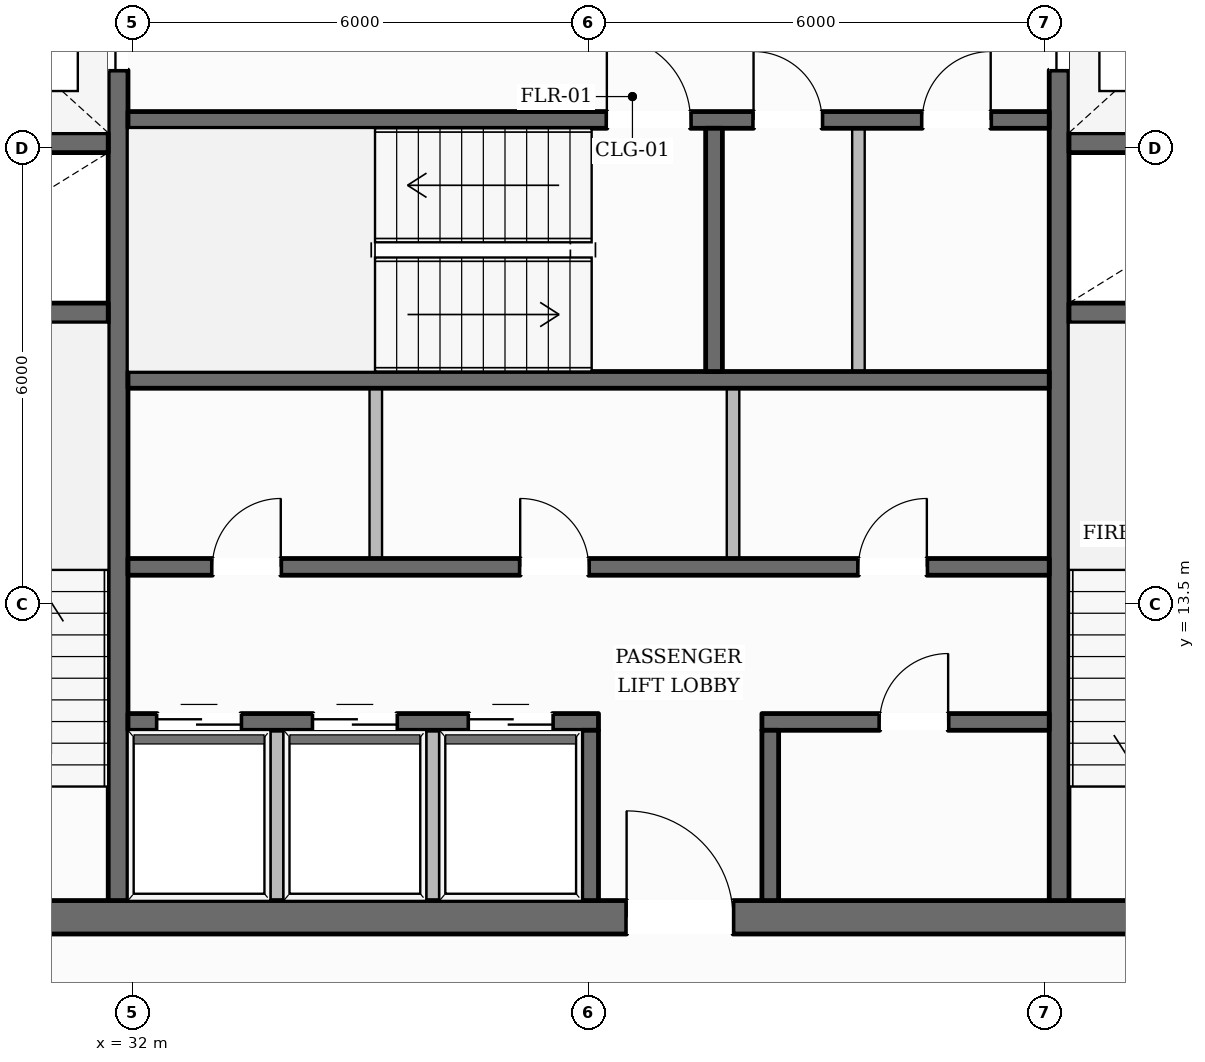
"""IFC4 building model, lengths in metres.
Left out: names, types, materials, properties, quantities, classifications, styles, units other than length and angle.
Written with IfcOpenShell. Run it as: python <this file> out.ifc"""

import sys

from ifc_helpers import new_model, si_unit, direction, frame, frame_2d, origin, place, context, subcontext, project, spatial, rectangle, extrude, element, fill, save


model = new_model("IFC4")
c1 = context("Model", 3, precision=1e-05, world=origin(), true_north=direction((0.0, 1.0)))
c2 = subcontext(c1, "Body", "Model", "MODEL_VIEW")
j1 = project(units=[si_unit("LENGTHUNIT", "METRE"), si_unit("PLANEANGLEUNIT", "RADIAN")], contexts=[c1])
p1 = place(None, origin())
s1 = spatial("IfcSite", under=j1, at=p1, CompositionType="ELEMENT")
p2 = place(p1, origin())
s2 = spatial("IfcBuilding", under=s1, at=p2, CompositionType="ELEMENT")
p3 = place(p2, frame((0.0, 0.0, 207.35)))
s3 = spatial("IfcBuildingStorey", under=s2, at=p3, CompositionType="ELEMENT", Elevation=207.35)
p4 = place(p3, frame((28.04, 9.38, 0.0), z_axis=(0.0, 0.0, 1.0), x_axis=(1.0, 0.0, 0.0)))
e1 = element("IfcWall", 1, at=p4, inside=s3, PredefinedType="SOLIDWALL", context=c2, shape_type="SweptSolid", body=[
    extrude(rectangle(XDim=19.92, YDim=0.44, at=frame_2d((9.96, 0.0))), origin(), (0.0, 0.0, 1.0), 3.6),
])
p5 = place(p4, frame((10.46, 0.0, 0.0)))
e2 = element("IfcOpeningElement", 2, at=p5, cuts=e1, PredefinedType="OPENING", context=c2, shape_type="SweptSolid", body=[
    extrude(rectangle(XDim=1.4, YDim=2.2, at=frame_2d((0.7, 1.1))), frame((0.0, 0.23, 0.0), z_axis=(0.0, -1.0, 0.0), x_axis=(1.0, 0.0, 0.0)), (0.0, 0.0, 1.0), 0.46),
])
p6 = place(p3, frame((31.81, 9.6, 0.0), z_axis=(0.0, 0.0, 1.0), x_axis=(0.0, 1.0, 0.0)))
e3 = element("IfcWall", 3, at=p6, inside=s3, PredefinedType="SHEAR", context=c2, shape_type="SweptSolid", body=[
    extrude(rectangle(XDim=13.0, YDim=0.26, at=frame_2d((6.5, 0.0))), origin(), (0.0, 0.0, 1.0), 3.6),
])
p7 = place(p6, frame((10.925, 0.0, 0.0)))
e4 = element("IfcOpeningElement", 4, at=p7, cuts=e3, PredefinedType="OPENING", context=c2, shape_type="SweptSolid", body=[
    extrude(rectangle(XDim=1.25, YDim=2.25, at=frame_2d((0.625, 1.125))), frame((0.0, 0.14, 0.0), z_axis=(0.0, -1.0, 0.0), x_axis=(1.0, 0.0, 0.0)), (0.0, 0.0, 1.0), 0.28),
])
p8 = place(p3, frame((44.19, 9.6, 0.0), z_axis=(0.0, 0.0, 1.0), x_axis=(0.0, 1.0, 0.0)))
e5 = element("IfcWall", 5, at=p8, inside=s3, PredefinedType="SHEAR", context=c2, shape_type="SweptSolid", body=[
    extrude(rectangle(XDim=13.0, YDim=0.26, at=frame_2d((6.5, 0.0))), origin(), (0.0, 0.0, 1.0), 3.6),
])
p9 = place(p8, frame((10.925, 0.0, 0.0)))
e6 = element("IfcOpeningElement", 6, at=p9, cuts=e5, PredefinedType="OPENING", context=c2, shape_type="SweptSolid", body=[
    extrude(rectangle(XDim=1.25, YDim=2.25, at=frame_2d((0.625, 1.125))), frame((0.0, 0.14, 0.0), z_axis=(0.0, -1.0, 0.0), x_axis=(1.0, 0.0, 0.0)), (0.0, 0.0, 1.0), 0.28),
])
for number, where, z_axis, x_axis in (
    (7, (28.48, 17.33, 0.0), (0.0, 0.0, 1.0), (1.0, 0.0, 0.0)),
    (8, (28.48, 19.57, 0.0), (0.0, 0.0, 1.0), (1.0, 0.0, 0.0)),
    (9, (44.32, 17.33, 0.0), (0.0, 0.0, 1.0), (1.0, 0.0, 0.0)),
    (10, (44.32, 19.57, 0.0), (0.0, 0.0, 1.0), (1.0, 0.0, 0.0)),
):
    element("IfcWall", number, at=place(p3, frame(where, z_axis=z_axis, x_axis=x_axis)), inside=s3, PredefinedType="SHEAR", context=c2, shape_type="SweptSolid", body=[
        extrude(rectangle(XDim=3.2, YDim=0.26, at=frame_2d((1.6, 0.0))), origin(), (0.0, 0.0, 1.0), 3.6),
    ])
p10 = place(p3, frame((31.94, 19.87, 0.0), z_axis=(0.0, 0.0, 1.0), x_axis=(1.0, 0.0, 0.0)))
e11 = element("IfcWall", 11, at=p10, inside=s3, PredefinedType="SOLIDWALL", context=c2, shape_type="SweptSolid", body=[
    extrude(rectangle(XDim=12.12, YDim=0.22, at=frame_2d((6.06, 0.0))), origin(), (0.0, 0.0, 1.0), 3.6),
])
p11 = place(p10, frame((6.3, 0.0, 0.0)))
e12 = element("IfcOpeningElement", 12, at=p11, cuts=e11, PredefinedType="OPENING", context=c2, shape_type="SweptSolid", body=[
    extrude(rectangle(XDim=1.1, YDim=2.15, at=frame_2d((0.55, 1.075))), frame((0.0, 0.12, 0.0), z_axis=(0.0, -1.0, 0.0), x_axis=(1.0, 0.0, 0.0)), (0.0, 0.0, 1.0), 0.24),
])
p12 = place(p10, frame((8.23, 0.0, 0.0)))
e13 = element("IfcOpeningElement", 13, at=p12, cuts=e11, PredefinedType="OPENING", context=c2, shape_type="SweptSolid", body=[
    extrude(rectangle(XDim=0.9, YDim=2.1, at=frame_2d((0.45, 1.05))), frame((0.0, 0.12, 0.0), z_axis=(0.0, -1.0, 0.0), x_axis=(1.0, 0.0, 0.0)), (0.0, 0.0, 1.0), 0.24),
])
p13 = place(p10, frame((10.45, 0.0, 0.0)))
e14 = element("IfcOpeningElement", 14, at=p13, cuts=e11, PredefinedType="OPENING", context=c2, shape_type="SweptSolid", body=[
    extrude(rectangle(XDim=0.9, YDim=2.1, at=frame_2d((0.45, 1.05))), frame((0.0, 0.12, 0.0), z_axis=(0.0, -1.0, 0.0), x_axis=(1.0, 0.0, 0.0)), (0.0, 0.0, 1.0), 0.24),
])
p14 = place(p3, frame((31.94, 16.45, 0.0), z_axis=(0.0, 0.0, 1.0), x_axis=(1.0, 0.0, 0.0)))
e15 = element("IfcWall", 15, at=p14, inside=s3, PredefinedType="SOLIDWALL", context=c2, shape_type="SweptSolid", body=[
    extrude(rectangle(XDim=12.12, YDim=0.22, at=frame_2d((6.06, 0.0))), origin(), (0.0, 0.0, 1.0), 3.6),
])
p15 = place(p3, frame((39.65, 16.56, 0.0), z_axis=(0.0, 0.0, 1.0), x_axis=(0.0, 1.0, 0.0)))
e16 = element("IfcWall", 16, at=p15, inside=s3, PredefinedType="SOLIDWALL", context=c2, shape_type="SweptSolid", body=[
    extrude(rectangle(XDim=3.2, YDim=0.22, at=frame_2d((1.6, 0.0))), origin(), (0.0, 0.0, 1.0), 3.6),
])
p16 = place(p3, frame((31.94, 13.99, 0.0), z_axis=(0.0, 0.0, 1.0), x_axis=(1.0, 0.0, 0.0)))
e17 = element("IfcWall", 17, at=p16, inside=s3, PredefinedType="SOLIDWALL", context=c2, shape_type="SweptSolid", body=[
    extrude(rectangle(XDim=12.12, YDim=0.22, at=frame_2d((6.06, 0.0))), origin(), (0.0, 0.0, 1.0), 3.6),
])
p17 = place(p16, frame((1.11, 0.0, 0.0)))
e18 = element("IfcOpeningElement", 18, at=p17, cuts=e17, PredefinedType="OPENING", context=c2, shape_type="SweptSolid", body=[
    extrude(rectangle(XDim=0.9, YDim=2.1, at=frame_2d((0.45, 1.05))), frame((0.0, 0.12, 0.0), z_axis=(0.0, -1.0, 0.0), x_axis=(1.0, 0.0, 0.0)), (0.0, 0.0, 1.0), 0.24),
])
p18 = place(p16, frame((5.16, 0.0, 0.0)))
e19 = element("IfcOpeningElement", 19, at=p18, cuts=e17, PredefinedType="OPENING", context=c2, shape_type="SweptSolid", body=[
    extrude(rectangle(XDim=0.9, YDim=2.1, at=frame_2d((0.45, 1.05))), frame((0.0, 0.12, 0.0), z_axis=(0.0, -1.0, 0.0), x_axis=(1.0, 0.0, 0.0)), (0.0, 0.0, 1.0), 0.24),
])
p19 = place(p16, frame((9.61, 0.0, 0.0)))
e20 = element("IfcOpeningElement", 20, at=p19, cuts=e17, PredefinedType="OPENING", context=c2, shape_type="SweptSolid", body=[
    extrude(rectangle(XDim=0.9, YDim=2.1, at=frame_2d((0.45, 1.05))), frame((0.0, 0.12, 0.0), z_axis=(0.0, -1.0, 0.0), x_axis=(1.0, 0.0, 0.0)), (0.0, 0.0, 1.0), 0.24),
])
p20 = place(p3, frame((31.94, 11.95, 0.0), z_axis=(0.0, 0.0, 1.0), x_axis=(1.0, 0.0, 0.0)))
e21 = element("IfcWall", 21, at=p20, inside=s3, PredefinedType="SOLIDWALL", context=c2, shape_type="SweptSolid", body=[
    extrude(rectangle(XDim=6.19, YDim=0.22, at=frame_2d((3.095, 0.0))), origin(), (0.0, 0.0, 1.0), 3.6),
])
p21 = place(p20, frame((0.385, 0.0, 0.0)))
e22 = element("IfcOpeningElement", 22, at=p21, cuts=e21, PredefinedType="OPENING", context=c2, shape_type="SweptSolid", body=[
    extrude(rectangle(XDim=1.1, YDim=2.2, at=frame_2d((0.55, 1.1))), frame((0.0, 0.12, 0.0), z_axis=(0.0, -1.0, 0.0), x_axis=(1.0, 0.0, 0.0)), (0.0, 0.0, 1.0), 0.24),
])
p22 = place(p20, frame((2.435, 0.0, 0.0)))
e23 = element("IfcOpeningElement", 23, at=p22, cuts=e21, PredefinedType="OPENING", context=c2, shape_type="SweptSolid", body=[
    extrude(rectangle(XDim=1.1, YDim=2.2, at=frame_2d((0.55, 1.1))), frame((0.0, 0.12, 0.0), z_axis=(0.0, -1.0, 0.0), x_axis=(1.0, 0.0, 0.0)), (0.0, 0.0, 1.0), 0.24),
])
p23 = place(p20, frame((4.485, 0.0, 0.0)))
e24 = element("IfcOpeningElement", 24, at=p23, cuts=e21, PredefinedType="OPENING", context=c2, shape_type="SweptSolid", body=[
    extrude(rectangle(XDim=1.1, YDim=2.2, at=frame_2d((0.55, 1.1))), frame((0.0, 0.12, 0.0), z_axis=(0.0, -1.0, 0.0), x_axis=(1.0, 0.0, 0.0)), (0.0, 0.0, 1.0), 0.24),
])
p24 = place(p3, frame((40.28, 11.95, 0.0), z_axis=(0.0, 0.0, 1.0), x_axis=(1.0, 0.0, 0.0)))
e25 = element("IfcWall", 25, at=p24, inside=s3, PredefinedType="SOLIDWALL", context=c2, shape_type="SweptSolid", body=[
    extrude(rectangle(XDim=3.78, YDim=0.22, at=frame_2d((1.89, 0.0))), origin(), (0.0, 0.0, 1.0), 3.6),
])
p25 = place(p24, frame((1.55, 0.0, 0.0)))
e26 = element("IfcOpeningElement", 26, at=p25, cuts=e25, PredefinedType="OPENING", context=c2, shape_type="SweptSolid", body=[
    extrude(rectangle(XDim=0.9, YDim=2.1, at=frame_2d((0.45, 1.05))), frame((0.0, 0.12, 0.0), z_axis=(0.0, -1.0, 0.0), x_axis=(1.0, 0.0, 0.0)), (0.0, 0.0, 1.0), 0.24),
])
for number, where, z_axis, x_axis in (
    (27, (38.02, 9.6, 0.0), (0.0, 0.0, 1.0), (0.0, 1.0, 0.0)),
    (28, (40.39, 9.6, 0.0), (0.0, 0.0, 1.0), (0.0, 1.0, 0.0)),
):
    element("IfcWall", number, at=place(p3, frame(where, z_axis=z_axis, x_axis=x_axis)), inside=s3, PredefinedType="SOLIDWALL", context=c2, shape_type="SweptSolid", body=[
        extrude(rectangle(XDim=2.24, YDim=0.22, at=frame_2d((1.12, 0.0))), origin(), (0.0, 0.0, 1.0), 3.6),
    ])
p26 = place(p3, frame((14.256, 11.0, 0.0), z_axis=(0.0, 0.0, 1.0), x_axis=(0.508231558921, 0.861220461042, 0.0)))
e29 = element("IfcWall", 29, at=p26, inside=s3, PredefinedType="STANDARD", context=c2, shape_type="SweptSolid", body=[
    extrude(rectangle(XDim=38.41, YDim=0.35, at=frame_2d((19.205, 0.0))), origin(), (0.0, 0.0, 1.0), 3.132),
])
p27 = place(p26, frame((34.091, 0.0, 0.65)))
e30 = element("IfcOpeningElement", 30, at=p27, cuts=e29, PredefinedType="OPENING", context=c2, shape_type="SweptSolid", body=[
    extrude(rectangle(XDim=1.45, YDim=1.75, at=frame_2d((0.725, 0.875))), frame((0.0, 0.185, 0.0), z_axis=(0.0, -1.0, 0.0), x_axis=(1.0, 0.0, 0.0)), (0.0, 0.0, 1.0), 0.37),
])
p28 = place(p26, frame((27.848, 0.0, 0.65)))
e31 = element("IfcOpeningElement", 31, at=p28, cuts=e29, PredefinedType="OPENING", context=c2, shape_type="SweptSolid", body=[
    extrude(rectangle(XDim=1.45, YDim=1.75, at=frame_2d((0.725, 0.875))), frame((0.0, 0.185, 0.0), z_axis=(0.0, -1.0, 0.0), x_axis=(1.0, 0.0, 0.0)), (0.0, 0.0, 1.0), 0.37),
])
p29 = place(p26, frame((21.606, 0.0, 0.65)))
e32 = element("IfcOpeningElement", 32, at=p29, cuts=e29, PredefinedType="OPENING", context=c2, shape_type="SweptSolid", body=[
    extrude(rectangle(XDim=1.45, YDim=1.75, at=frame_2d((0.725, 0.875))), frame((0.0, 0.185, 0.0), z_axis=(0.0, -1.0, 0.0), x_axis=(1.0, 0.0, 0.0)), (0.0, 0.0, 1.0), 0.37),
])
p30 = place(p26, frame((9.121, 0.0, 0.65)))
e33 = element("IfcOpeningElement", 33, at=p30, cuts=e29, PredefinedType="OPENING", context=c2, shape_type="SweptSolid", body=[
    extrude(rectangle(XDim=1.45, YDim=1.75, at=frame_2d((0.725, 0.875))), frame((0.0, 0.185, 0.0), z_axis=(0.0, -1.0, 0.0), x_axis=(1.0, 0.0, 0.0)), (0.0, 0.0, 1.0), 0.37),
])
p31 = place(p26, frame((2.878, 0.0, 0.65)))
e34 = element("IfcOpeningElement", 34, at=p31, cuts=e29, PredefinedType="OPENING", context=c2, shape_type="SweptSolid", body=[
    extrude(rectangle(XDim=1.45, YDim=1.75, at=frame_2d((0.725, 0.875))), frame((0.0, 0.185, 0.0), z_axis=(0.0, -1.0, 0.0), x_axis=(1.0, 0.0, 0.0)), (0.0, 0.0, 1.0), 0.37),
])
p32 = place(p3, frame((42.167, 44.113, 0.0), z_axis=(0.0, 0.0, 1.0), x_axis=(0.50509390827, -0.863064391473, 0.0)))
e35 = element("IfcWall", 35, at=p32, inside=s3, PredefinedType="STANDARD", context=c2, shape_type="SweptSolid", body=[
    extrude(rectangle(XDim=38.167, YDim=0.35, at=frame_2d((19.083, 0.0))), origin(), (0.0, 0.0, 1.0), 3.132),
])
p33 = place(p32, frame((28.025, 0.0, 0.0)))
e36 = element("IfcOpeningElement", 36, at=p33, cuts=e35, PredefinedType="OPENING", context=c2, shape_type="SweptSolid", body=[
    extrude(rectangle(XDim=1.0, YDim=2.2, at=frame_2d((0.5, 1.1))), frame((0.0, 0.185, 0.0), z_axis=(0.0, -1.0, 0.0), x_axis=(1.0, 0.0, 0.0)), (0.0, 0.0, 1.0), 0.37),
])
p34 = place(p32, frame((33.859, 0.0, 0.65)))
e37 = element("IfcOpeningElement", 37, at=p34, cuts=e35, PredefinedType="OPENING", context=c2, shape_type="SweptSolid", body=[
    extrude(rectangle(XDim=1.45, YDim=1.75, at=frame_2d((0.725, 0.875))), frame((0.0, 0.185, 0.0), z_axis=(0.0, -1.0, 0.0), x_axis=(1.0, 0.0, 0.0)), (0.0, 0.0, 1.0), 0.37),
])
p35 = place(p32, frame((21.456, 0.0, 0.65)))
e38 = element("IfcOpeningElement", 38, at=p35, cuts=e35, PredefinedType="OPENING", context=c2, shape_type="SweptSolid", body=[
    extrude(rectangle(XDim=1.45, YDim=1.75, at=frame_2d((0.725, 0.875))), frame((0.0, 0.185, 0.0), z_axis=(0.0, -1.0, 0.0), x_axis=(1.0, 0.0, 0.0)), (0.0, 0.0, 1.0), 0.37),
])
p36 = place(p32, frame((9.053, 0.0, 0.65)))
e39 = element("IfcOpeningElement", 39, at=p36, cuts=e35, PredefinedType="OPENING", context=c2, shape_type="SweptSolid", body=[
    extrude(rectangle(XDim=1.45, YDim=1.75, at=frame_2d((0.725, 0.875))), frame((0.0, 0.185, 0.0), z_axis=(0.0, -1.0, 0.0), x_axis=(1.0, 0.0, 0.0)), (0.0, 0.0, 1.0), 0.37),
])
p37 = place(p32, frame((2.852, 0.0, 0.65)))
e40 = element("IfcOpeningElement", 40, at=p37, cuts=e35, PredefinedType="OPENING", context=c2, shape_type="SweptSolid", body=[
    extrude(rectangle(XDim=1.45, YDim=1.75, at=frame_2d((0.725, 0.875))), frame((0.0, 0.185, 0.0), z_axis=(0.0, -1.0, 0.0), x_axis=(1.0, 0.0, 0.0)), (0.0, 0.0, 1.0), 0.37),
])
for number, where, z_axis, x_axis in (
    (41, (33.9, 9.52, 0.0), (0.0, 0.0, 1.0), (0.0, 1.0, 0.0)),
    (42, (35.95, 9.52, 0.0), (0.0, 0.0, 1.0), (0.0, 1.0, 0.0)),
):
    element("IfcWall", number, at=place(p3, frame(where, z_axis=z_axis, x_axis=x_axis)), inside=s3, PredefinedType="PARTITIONING", context=c2, shape_type="SweptSolid", body=[
        extrude(rectangle(XDim=2.32, YDim=0.165, at=frame_2d((1.16, 0.0))), origin(), (0.0, 0.0, 1.0), 3.6),
    ])
for number, where, z_axis, x_axis in (
    (43, (35.2, 14.1, 0.0), (0.0, 0.0, 1.0), (0.0, 1.0, 0.0)),
    (44, (39.9, 14.1, 0.0), (0.0, 0.0, 1.0), (0.0, 1.0, 0.0)),
):
    element("IfcWall", number, at=place(p3, frame(where, z_axis=z_axis, x_axis=x_axis)), inside=s3, PredefinedType="PARTITIONING", context=c2, shape_type="SweptSolid", body=[
        extrude(rectangle(XDim=2.24, YDim=0.165, at=frame_2d((1.12, 0.0))), origin(), (0.0, 0.0, 1.0), 3.6),
    ])
p38 = place(p3, frame((41.55, 16.56, 0.0), z_axis=(0.0, 0.0, 1.0), x_axis=(0.0, 1.0, 0.0)))
e45 = element("IfcWall", 45, at=p38, inside=s3, PredefinedType="PARTITIONING", context=c2, shape_type="SweptSolid", body=[
    extrude(rectangle(XDim=3.2, YDim=0.165, at=frame_2d((1.6, 0.0))), origin(), (0.0, 0.0, 1.0), 3.6),
])
p39 = place(p11, origin())
e46 = element("IfcDoor", 46, at=p39, inside=s3, OperationType="SINGLE_SWING_LEFT", PredefinedType="DOOR", context=c2, shape_type="SweptSolid", body=[
    extrude(rectangle(XDim=1.1, YDim=2.15, at=frame_2d((0.55, 1.075))), frame((0.0, 0.025, 0.0), z_axis=(0.0, -1.0, 0.0), x_axis=(1.0, 0.0, 0.0)), (0.0, 0.0, 1.0), 0.05),
])
fill(e12, e46)
p40 = place(p7, origin())
e47 = element("IfcDoor", 47, at=p40, inside=s3, OperationType="DOUBLE_DOOR_SLIDING", PredefinedType="DOOR", context=c2, shape_type="SweptSolid", body=[
    extrude(rectangle(XDim=1.25, YDim=2.25, at=frame_2d((0.625, 1.125))), frame((0.0, 0.025, 0.0), z_axis=(0.0, -1.0, 0.0), x_axis=(1.0, 0.0, 0.0)), (0.0, 0.0, 1.0), 0.05),
])
fill(e4, e47)
p41 = place(p9, origin())
e48 = element("IfcDoor", 48, at=p41, inside=s3, OperationType="DOUBLE_DOOR_SLIDING", PredefinedType="DOOR", context=c2, shape_type="SweptSolid", body=[
    extrude(rectangle(XDim=1.25, YDim=2.25, at=frame_2d((0.625, 1.125))), frame((0.0, 0.025, 0.0), z_axis=(0.0, -1.0, 0.0), x_axis=(1.0, 0.0, 0.0)), (0.0, 0.0, 1.0), 0.05),
])
fill(e6, e48)
p42 = place(p5, origin())
e49 = element("IfcDoor", 49, at=p42, inside=s3, OperationType="SINGLE_SWING_LEFT", PredefinedType="DOOR", context=c2, shape_type="SweptSolid", body=[
    extrude(rectangle(XDim=1.4, YDim=2.2, at=frame_2d((0.7, 1.1))), frame((0.0, 0.025, 0.0), z_axis=(0.0, -1.0, 0.0), x_axis=(1.0, 0.0, 0.0)), (0.0, 0.0, 1.0), 0.05),
])
fill(e2, e49)
p43 = place(p21, origin())
e50 = element("IfcDoor", 50, at=p43, inside=s3, OperationType="DOUBLE_DOOR_SLIDING", PredefinedType="DOOR", context=c2, shape_type="SweptSolid", body=[
    extrude(rectangle(XDim=1.1, YDim=2.2, at=frame_2d((0.55, 1.1))), frame((0.0, 0.025, 0.0), z_axis=(0.0, -1.0, 0.0), x_axis=(1.0, 0.0, 0.0)), (0.0, 0.0, 1.0), 0.05),
])
fill(e22, e50)
p44 = place(p22, origin())
e51 = element("IfcDoor", 51, at=p44, inside=s3, OperationType="DOUBLE_DOOR_SLIDING", PredefinedType="DOOR", context=c2, shape_type="SweptSolid", body=[
    extrude(rectangle(XDim=1.1, YDim=2.2, at=frame_2d((0.55, 1.1))), frame((0.0, 0.025, 0.0), z_axis=(0.0, -1.0, 0.0), x_axis=(1.0, 0.0, 0.0)), (0.0, 0.0, 1.0), 0.05),
])
fill(e23, e51)
p45 = place(p23, origin())
e52 = element("IfcDoor", 52, at=p45, inside=s3, OperationType="DOUBLE_DOOR_SLIDING", PredefinedType="DOOR", context=c2, shape_type="SweptSolid", body=[
    extrude(rectangle(XDim=1.1, YDim=2.2, at=frame_2d((0.55, 1.1))), frame((0.0, 0.025, 0.0), z_axis=(0.0, -1.0, 0.0), x_axis=(1.0, 0.0, 0.0)), (0.0, 0.0, 1.0), 0.05),
])
fill(e24, e52)
p46 = place(p17, origin())
e53 = element("IfcDoor", 53, at=p46, inside=s3, OperationType="SINGLE_SWING_RIGHT", PredefinedType="DOOR", context=c2, shape_type="SweptSolid", body=[
    extrude(rectangle(XDim=0.9, YDim=2.1, at=frame_2d((0.45, 1.05))), frame((0.0, 0.025, 0.0), z_axis=(0.0, -1.0, 0.0), x_axis=(1.0, 0.0, 0.0)), (0.0, 0.0, 1.0), 0.05),
])
fill(e18, e53)
p47 = place(p18, origin())
e54 = element("IfcDoor", 54, at=p47, inside=s3, OperationType="SINGLE_SWING_LEFT", PredefinedType="DOOR", context=c2, shape_type="SweptSolid", body=[
    extrude(rectangle(XDim=0.9, YDim=2.1, at=frame_2d((0.45, 1.05))), frame((0.0, 0.025, 0.0), z_axis=(0.0, -1.0, 0.0), x_axis=(1.0, 0.0, 0.0)), (0.0, 0.0, 1.0), 0.05),
])
fill(e19, e54)
p48 = place(p19, origin())
e55 = element("IfcDoor", 55, at=p48, inside=s3, OperationType="SINGLE_SWING_RIGHT", PredefinedType="DOOR", context=c2, shape_type="SweptSolid", body=[
    extrude(rectangle(XDim=0.9, YDim=2.1, at=frame_2d((0.45, 1.05))), frame((0.0, 0.025, 0.0), z_axis=(0.0, -1.0, 0.0), x_axis=(1.0, 0.0, 0.0)), (0.0, 0.0, 1.0), 0.05),
])
fill(e20, e55)
p49 = place(p12, origin())
e56 = element("IfcDoor", 56, at=p49, inside=s3, OperationType="SINGLE_SWING_LEFT", PredefinedType="DOOR", context=c2, shape_type="SweptSolid", body=[
    extrude(rectangle(XDim=0.9, YDim=2.1, at=frame_2d((0.45, 1.05))), frame((0.0, 0.025, 0.0), z_axis=(0.0, -1.0, 0.0), x_axis=(1.0, 0.0, 0.0)), (0.0, 0.0, 1.0), 0.05),
])
fill(e13, e56)
p50 = place(p13, origin())
e57 = element("IfcDoor", 57, at=p50, inside=s3, OperationType="SINGLE_SWING_RIGHT", PredefinedType="DOOR", context=c2, shape_type="SweptSolid", body=[
    extrude(rectangle(XDim=0.9, YDim=2.1, at=frame_2d((0.45, 1.05))), frame((0.0, 0.025, 0.0), z_axis=(0.0, -1.0, 0.0), x_axis=(1.0, 0.0, 0.0)), (0.0, 0.0, 1.0), 0.05),
])
fill(e14, e57)
p51 = place(p25, origin())
e58 = element("IfcDoor", 58, at=p51, inside=s3, OperationType="SINGLE_SWING_RIGHT", PredefinedType="DOOR", context=c2, shape_type="SweptSolid", body=[
    extrude(rectangle(XDim=0.9, YDim=2.1, at=frame_2d((0.45, 1.05))), frame((0.0, 0.025, 0.0), z_axis=(0.0, -1.0, 0.0), x_axis=(1.0, 0.0, 0.0)), (0.0, 0.0, 1.0), 0.05),
])
fill(e26, e58)
save(model, sys.argv[1])
